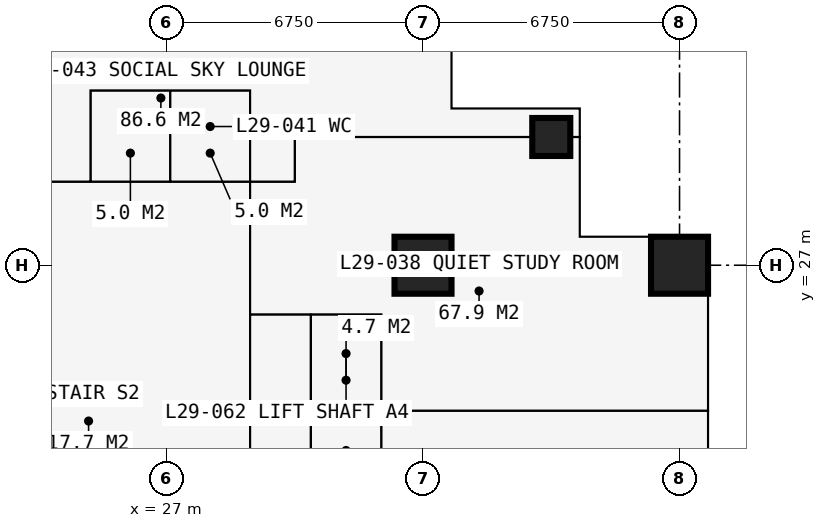
"""IFC4 building model, lengths in metres.
Left out: names, types, materials, properties, quantities, classifications, styles, units other than length and angle.
Written with IfcOpenShell. Run it as: python <this file> out.ifc"""

import sys

from ifc_helpers import new_model, si_unit, direction, frame, frame_2d, origin, origin_2d, place, context, subcontext, project, spatial, rectangle, extrude, element, fill, save


model = new_model("IFC4")
c1 = context("Model", 3, precision=1e-05, world=origin(), true_north=direction((0.0, 1.0)))
c2 = subcontext(c1, "Body", "Model", "MODEL_VIEW")
j1 = project(units=[si_unit("LENGTHUNIT", "METRE"), si_unit("PLANEANGLEUNIT", "RADIAN")], contexts=[c1])
p1 = place(None, origin())
s1 = spatial("IfcSite", under=j1, at=p1, CompositionType="ELEMENT")
p2 = place(p1, origin())
s2 = spatial("IfcBuilding", under=s1, at=p2, CompositionType="ELEMENT")
p3 = place(p2, frame((0.0, 0.0, 108.9)))
s3 = spatial("IfcBuildingStorey", under=s2, at=p3, CompositionType="ELEMENT", Elevation=108.9)
p4 = place(p3, frame((33.75, 27.0, 0.0), z_axis=(0.0, 0.0, 1.0), x_axis=(1.0, 0.0, 0.0)))
e1 = element("IfcColumn", 1, at=p4, inside=s3, PredefinedType="COLUMN", context=c2, shape_type="SweptSolid", body=[
    extrude(rectangle(XDim=1.5, YDim=1.5, at=origin_2d()), origin(), (0.0, 0.0, 1.0), 3.6),
])
p5 = place(p3, frame((37.125, 30.375, 0.0), z_axis=(0.0, 0.0, 1.0), x_axis=(1.0, 0.0, 0.0)))
e2 = element("IfcColumn", 2, at=p5, inside=s3, PredefinedType="COLUMN", context=c2, shape_type="SweptSolid", body=[
    extrude(rectangle(XDim=1.0, YDim=1.0, at=origin_2d()), origin(), (0.0, 0.0, 1.0), 3.6),
])
p6 = place(p3, frame((40.5, 27.0, 0.0), z_axis=(0.0, 0.0, 1.0), x_axis=(1.0, 0.0, 0.0)))
e3 = element("IfcColumn", 3, at=p6, inside=s3, PredefinedType="COLUMN", context=c2, shape_type="SweptSolid", body=[
    extrude(rectangle(XDim=1.5, YDim=1.5, at=origin_2d()), origin(), (0.0, 0.0, 1.0), 3.6),
])
p7 = place(p3, frame((27.0, 14.1, 0.0), z_axis=(0.0, 0.0, 1.0), x_axis=(0.0, 1.0, 0.0)))
e4 = element("IfcWall", 4, at=p7, inside=s3, PredefinedType="SHEAR", context=c2, shape_type="SweptSolid", body=[
    extrude(rectangle(XDim=12.3, YDim=1.2, at=frame_2d((6.15, 0.0))), origin(), (0.0, 0.0, 1.0), 3.6),
])
p8 = place(p7, frame((3.65, 0.0, 0.0)))
e5 = element("IfcOpeningElement", 5, at=p8, cuts=e4, PredefinedType="OPENING", context=c2, shape_type="SweptSolid", body=[
    extrude(rectangle(XDim=1.2, YDim=2.2, at=frame_2d((0.6, 1.1))), frame((0.0, 0.61, 0.0), z_axis=(0.0, -1.0, 0.0), x_axis=(1.0, 0.0, 0.0)), (0.0, 0.0, 1.0), 1.22),
])
p9 = place(p3, frame((27.6, 27.0, 0.0), z_axis=(0.0, 0.0, 1.0), x_axis=(-1.0, 0.0, 0.0)))
e6 = element("IfcWall", 6, at=p9, inside=s3, PredefinedType="SHEAR", context=c2, shape_type="SweptSolid", body=[
    extrude(rectangle(XDim=14.7, YDim=1.2, at=frame_2d((7.35, 0.0))), origin(), (0.0, 0.0, 1.0), 3.6),
])
p10 = place(p9, frame((4.55, 0.0, 0.0)))
e7 = element("IfcOpeningElement", 7, at=p10, cuts=e6, PredefinedType="OPENING", context=c2, shape_type="SweptSolid", body=[
    extrude(rectangle(XDim=0.9, YDim=2.2, at=frame_2d((0.45, 1.1))), frame((0.0, 0.61, 0.0), z_axis=(0.0, -1.0, 0.0), x_axis=(1.0, 0.0, 0.0)), (0.0, 0.0, 1.0), 1.22),
])
p11 = place(p9, frame((7.525, 0.0, 0.0)))
e8 = element("IfcOpeningElement", 8, at=p11, cuts=e6, PredefinedType="OPENING", context=c2, shape_type="SweptSolid", body=[
    extrude(rectangle(XDim=1.0, YDim=2.2, at=frame_2d((0.5, 1.1))), frame((0.0, 0.61, 0.0), z_axis=(0.0, -1.0, 0.0), x_axis=(1.0, 0.0, 0.0)), (0.0, 0.0, 1.0), 1.22),
])
p12 = place(p3, frame((41.25, 27.75, 0.0), z_axis=(0.0, 0.0, 1.0), x_axis=(-1.0, 0.0, 0.0)))
e9 = element("IfcWall", 9, at=p12, inside=s3, PredefinedType="SOLIDWALL", context=c2, shape_type="SweptSolid", body=[
    extrude(rectangle(XDim=3.375, YDim=0.3, at=frame_2d((1.688, 0.0))), origin(), (0.0, 0.0, 1.0), 3.375),
])
p13 = place(p12, frame((1.607, 0.0, 0.9)))
e10 = element("IfcOpeningElement", 10, at=p13, cuts=e9, PredefinedType="OPENING", context=c2, shape_type="SweptSolid", body=[
    extrude(rectangle(XDim=1.5, YDim=1.8, at=frame_2d((0.75, 0.9))), frame((0.0, 0.16, 0.0), z_axis=(0.0, -1.0, 0.0), x_axis=(1.0, 0.0, 0.0)), (0.0, 0.0, 1.0), 0.32),
])
p14 = place(p3, frame((37.875, 27.75, 0.0), z_axis=(0.0, 0.0, 1.0), x_axis=(0.0, 1.0, 0.0)))
e11 = element("IfcWall", 11, at=p14, inside=s3, PredefinedType="SOLIDWALL", context=c2, shape_type="SweptSolid", body=[
    extrude(rectangle(XDim=3.375, YDim=0.3, at=frame_2d((1.688, 0.0))), origin(), (0.0, 0.0, 1.0), 3.375),
])
p15 = place(p14, frame((0.788, 0.0, 0.6)))
e12 = element("IfcOpeningElement", 12, at=p15, cuts=e11, PredefinedType="OPENING", context=c2, shape_type="SweptSolid", body=[
    extrude(rectangle(XDim=1.8, YDim=2.1, at=frame_2d((0.9, 1.05))), frame((0.0, 0.16, 0.0), z_axis=(0.0, -1.0, 0.0), x_axis=(1.0, 0.0, 0.0)), (0.0, 0.0, 1.0), 0.32),
])
p16 = place(p3, frame((37.875, 31.125, 0.0), z_axis=(0.0, 0.0, 1.0), x_axis=(-1.0, 0.0, 0.0)))
e13 = element("IfcWall", 13, at=p16, inside=s3, PredefinedType="SOLIDWALL", context=c2, shape_type="SweptSolid", body=[
    extrude(rectangle(XDim=3.375, YDim=0.3, at=frame_2d((1.688, 0.0))), origin(), (0.0, 0.0, 1.0), 3.375),
])
p17 = place(p16, frame((0.788, 0.0, 0.6)))
e14 = element("IfcOpeningElement", 14, at=p17, cuts=e13, PredefinedType="OPENING", context=c2, shape_type="SweptSolid", body=[
    extrude(rectangle(XDim=1.8, YDim=2.1, at=frame_2d((0.9, 1.05))), frame((0.0, 0.16, 0.0), z_axis=(0.0, -1.0, 0.0), x_axis=(1.0, 0.0, 0.0)), (0.0, 0.0, 1.0), 0.32),
])
p18 = place(p3, frame((34.5, 31.125, 0.0), z_axis=(0.0, 0.0, 1.0), x_axis=(0.0, 1.0, 0.0)))
e15 = element("IfcWall", 15, at=p18, inside=s3, PredefinedType="SOLIDWALL", context=c2, shape_type="SweptSolid", body=[
    extrude(rectangle(XDim=3.375, YDim=0.3, at=frame_2d((1.688, 0.0))), origin(), (0.0, 0.0, 1.0), 3.375),
])
p19 = place(p18, frame((0.268, 0.0, 0.9)))
e16 = element("IfcOpeningElement", 16, at=p19, cuts=e15, PredefinedType="OPENING", context=c2, shape_type="SweptSolid", body=[
    extrude(rectangle(XDim=1.5, YDim=1.8, at=frame_2d((0.75, 0.9))), frame((0.0, 0.16, 0.0), z_axis=(0.0, -1.0, 0.0), x_axis=(1.0, 0.0, 0.0)), (0.0, 0.0, 1.0), 0.32),
])
p20 = place(p3, frame((11.3, 29.2, 0.0), z_axis=(0.0, 0.0, 1.0), x_axis=(1.0, 0.0, 0.0)))
e17 = element("IfcWall", 17, at=p20, inside=s3, PredefinedType="PARTITIONING", context=c2, shape_type="SweptSolid", body=[
    extrude(rectangle(XDim=19.075, YDim=0.15, at=frame_2d((9.538, 0.0))), origin(), (0.0, 0.0, 1.0), 3.375),
])
p21 = place(p20, frame((14.25, 0.0, 0.0)))
e18 = element("IfcOpeningElement", 18, at=p21, cuts=e17, PredefinedType="OPENING", context=c2, shape_type="SweptSolid", body=[
    extrude(rectangle(XDim=1.0, YDim=2.2, at=frame_2d((0.5, 1.1))), frame((0.0, 0.085, 0.0), z_axis=(0.0, -1.0, 0.0), x_axis=(1.0, 0.0, 0.0)), (0.0, 0.0, 1.0), 0.17),
])
p22 = place(p20, frame((16.35, 0.0, 0.0)))
e19 = element("IfcOpeningElement", 19, at=p22, cuts=e17, PredefinedType="OPENING", context=c2, shape_type="SweptSolid", body=[
    extrude(rectangle(XDim=1.0, YDim=2.2, at=frame_2d((0.5, 1.1))), frame((0.0, 0.085, 0.0), z_axis=(0.0, -1.0, 0.0), x_axis=(1.0, 0.0, 0.0)), (0.0, 0.0, 1.0), 0.17),
])
p23 = place(p20, frame((8.379, 0.0, 0.0)))
e20 = element("IfcOpeningElement", 20, at=p23, cuts=e17, PredefinedType="OPENING", context=c2, shape_type="SweptSolid", body=[
    extrude(rectangle(XDim=1.5, YDim=2.2, at=frame_2d((0.75, 1.1))), frame((0.0, 0.085, 0.0), z_axis=(0.0, -1.0, 0.0), x_axis=(1.0, 0.0, 0.0)), (0.0, 0.0, 1.0), 0.17),
])
p24 = place(p3, frame((25.0, 29.2, 0.0), z_axis=(0.0, 0.0, 1.0), x_axis=(0.0, 1.0, 0.0)))
e21 = element("IfcWall", 21, at=p24, inside=s3, PredefinedType="PARTITIONING", context=c2, shape_type="SweptSolid", body=[
    extrude(rectangle(XDim=2.4, YDim=0.1, at=frame_2d((1.2, 0.0))), origin(), (0.0, 0.0, 1.0), 3.375),
])
p25 = place(p3, frame((25.0, 31.6, 0.0), z_axis=(0.0, 0.0, 1.0), x_axis=(1.0, 0.0, 0.0)))
e22 = element("IfcWall", 22, at=p25, inside=s3, PredefinedType="PARTITIONING", context=c2, shape_type="SweptSolid", body=[
    extrude(rectangle(XDim=4.2, YDim=0.15, at=frame_2d((2.1, 0.0))), origin(), (0.0, 0.0, 1.0), 3.375),
])
p26 = place(p3, frame((27.1, 29.2, 0.0), z_axis=(0.0, 0.0, 1.0), x_axis=(0.0, 1.0, 0.0)))
e23 = element("IfcWall", 23, at=p26, inside=s3, PredefinedType="PARTITIONING", context=c2, shape_type="SweptSolid", body=[
    extrude(rectangle(XDim=2.4, YDim=0.1, at=frame_2d((1.2, 0.0))), origin(), (0.0, 0.0, 1.0), 2.806),
])
p27 = place(p3, frame((29.2, 11.3, 0.0), z_axis=(0.0, 0.0, 1.0), x_axis=(0.0, 1.0, 0.0)))
e24 = element("IfcWall", 24, at=p27, inside=s3, PredefinedType="PARTITIONING", context=c2, shape_type="SweptSolid", body=[
    extrude(rectangle(XDim=20.3, YDim=0.15, at=frame_2d((10.15, 0.0))), origin(), (0.0, 0.0, 1.0), 3.375),
])
p28 = place(p27, frame((8.35, 0.0, 0.0)))
e25 = element("IfcOpeningElement", 25, at=p28, cuts=e24, PredefinedType="OPENING", context=c2, shape_type="SweptSolid", body=[
    extrude(rectangle(XDim=1.2, YDim=2.2, at=frame_2d((0.6, 1.1))), frame((0.0, 0.085, 0.0), z_axis=(0.0, -1.0, 0.0), x_axis=(1.0, 0.0, 0.0)), (0.0, 0.0, 1.0), 0.17),
])
p29 = place(p3, frame((29.2, 25.7, 0.0), z_axis=(0.0, 0.0, 1.0), x_axis=(1.0, 0.0, 0.0)))
e26 = element("IfcWall", 26, at=p29, inside=s3, PredefinedType="SHEAR", context=c2, shape_type="SweptSolid", body=[
    extrude(rectangle(XDim=3.45, YDim=0.1, at=frame_2d((1.725, 0.0))), origin(), (0.0, 0.0, 1.0), 3.375),
])
p30 = place(p3, frame((30.375, 29.2, 0.0), z_axis=(0.0, 0.0, 1.0), x_axis=(0.0, 1.0, 0.0)))
e27 = element("IfcWall", 27, at=p30, inside=s3, PredefinedType="PARTITIONING", context=c2, shape_type="SweptSolid", body=[
    extrude(rectangle(XDim=1.175, YDim=0.15, at=frame_2d((0.587, 0.0))), origin(), (0.0, 0.0, 1.0), 3.375),
])
p31 = place(p3, frame((30.375, 30.375, 0.0), z_axis=(0.0, 0.0, 1.0), x_axis=(1.0, 0.0, 0.0)))
e28 = element("IfcWall", 28, at=p31, inside=s3, PredefinedType="PARTITIONING", context=c2, shape_type="SweptSolid", body=[
    extrude(rectangle(XDim=7.35, YDim=0.15, at=frame_2d((3.675, 0.0))), origin(), (0.0, 0.0, 1.0), 2.877),
])
p32 = place(p3, frame((30.8, 14.8, 0.0), z_axis=(0.0, 0.0, 1.0), x_axis=(0.0, 1.0, 0.0)))
e29 = element("IfcWall", 29, at=p32, inside=s3, PredefinedType="PARTITIONING", context=c2, shape_type="SweptSolid", body=[
    extrude(rectangle(XDim=10.9, YDim=0.15, at=frame_2d((5.45, 0.0))), origin(), (0.0, 0.0, 1.0), 3.375),
])
p33 = place(p32, frame((0.75, 0.0, 0.0)))
e30 = element("IfcOpeningElement", 30, at=p33, cuts=e29, PredefinedType="OPENING", context=c2, shape_type="SweptSolid", body=[
    extrude(rectangle(XDim=1.1, YDim=2.2, at=frame_2d((0.55, 1.1))), frame((0.0, 0.085, 0.0), z_axis=(0.0, -1.0, 0.0), x_axis=(1.0, 0.0, 0.0)), (0.0, 0.0, 1.0), 0.17),
])
p34 = place(p32, frame((3.25, 0.0, 0.0)))
e31 = element("IfcOpeningElement", 31, at=p34, cuts=e29, PredefinedType="OPENING", context=c2, shape_type="SweptSolid", body=[
    extrude(rectangle(XDim=1.1, YDim=2.2, at=frame_2d((0.55, 1.1))), frame((0.0, 0.085, 0.0), z_axis=(0.0, -1.0, 0.0), x_axis=(1.0, 0.0, 0.0)), (0.0, 0.0, 1.0), 0.17),
])
p35 = place(p32, frame((6.5, 0.0, 0.0)))
e32 = element("IfcOpeningElement", 32, at=p35, cuts=e29, PredefinedType="OPENING", context=c2, shape_type="SweptSolid", body=[
    extrude(rectangle(XDim=1.1, YDim=2.2, at=frame_2d((0.55, 1.1))), frame((0.0, 0.085, 0.0), z_axis=(0.0, -1.0, 0.0), x_axis=(1.0, 0.0, 0.0)), (0.0, 0.0, 1.0), 0.17),
])
p36 = place(p32, frame((9.05, 0.0, 0.0)))
e33 = element("IfcOpeningElement", 33, at=p36, cuts=e29, PredefinedType="OPENING", context=c2, shape_type="SweptSolid", body=[
    extrude(rectangle(XDim=1.1, YDim=2.2, at=frame_2d((0.55, 1.1))), frame((0.0, 0.085, 0.0), z_axis=(0.0, -1.0, 0.0), x_axis=(1.0, 0.0, 0.0)), (0.0, 0.0, 1.0), 0.17),
])
p37 = place(p3, frame((30.8, 23.15, 0.0), z_axis=(0.0, 0.0, 1.0), x_axis=(1.0, 0.0, 0.0)))
e34 = element("IfcWall", 34, at=p37, inside=s3, PredefinedType="SHEAR", context=c2, shape_type="SweptSolid", body=[
    extrude(rectangle(XDim=1.85, YDim=0.1, at=frame_2d((0.925, 0.0))), origin(), (0.0, 0.0, 1.0), 3.375),
])
p38 = place(p3, frame((32.65, 20.6, 0.0), z_axis=(0.0, 0.0, 1.0), x_axis=(0.0, 1.0, 0.0)))
e35 = element("IfcWall", 35, at=p38, inside=s3, PredefinedType="PARTITIONING", context=c2, shape_type="SweptSolid", body=[
    extrude(rectangle(XDim=5.1, YDim=0.15, at=frame_2d((2.55, 0.0))), origin(), (0.0, 0.0, 1.0), 3.375),
])
p39 = place(p3, frame((32.65, 23.168, 0.0), z_axis=(0.0, 0.0, 1.0), x_axis=(1.0, 0.0, 0.0)))
e36 = element("IfcWall", 36, at=p39, inside=s3, PredefinedType="PARTITIONING", context=c2, shape_type="SweptSolid", body=[
    extrude(rectangle(XDim=8.584, YDim=0.15, at=frame_2d((4.292, 0.0))), origin(), (0.0, 0.0, 1.0), 3.375),
])
p40 = place(p39, frame((3.5, 0.0, 0.0)))
e37 = element("IfcOpeningElement", 37, at=p40, cuts=e36, PredefinedType="OPENING", context=c2, shape_type="SweptSolid", body=[
    extrude(rectangle(XDim=1.6, YDim=2.4, at=frame_2d((0.8, 1.2))), frame((0.0, 0.085, 0.0), z_axis=(0.0, -1.0, 0.0), x_axis=(1.0, 0.0, 0.0)), (0.0, 0.0, 1.0), 0.17),
])
p41 = place(p13, origin())
e38 = element("IfcWindow", 38, at=p41, inside=s3, PartitioningType="SINGLE_PANEL", PredefinedType="WINDOW", context=c2, shape_type="SweptSolid", body=[
    extrude(rectangle(XDim=1.5, YDim=1.8, at=frame_2d((0.75, 0.9))), frame((0.0, 0.03, 0.0), z_axis=(0.0, -1.0, 0.0), x_axis=(1.0, 0.0, 0.0)), (0.0, 0.0, 1.0), 0.06),
])
fill(e10, e38)
p42 = place(p15, origin())
e39 = element("IfcWindow", 39, at=p42, inside=s3, PartitioningType="SINGLE_PANEL", PredefinedType="WINDOW", context=c2, shape_type="SweptSolid", body=[
    extrude(rectangle(XDim=1.8, YDim=2.1, at=frame_2d((0.9, 1.05))), frame((0.0, 0.03, 0.0), z_axis=(0.0, -1.0, 0.0), x_axis=(1.0, 0.0, 0.0)), (0.0, 0.0, 1.0), 0.06),
])
fill(e12, e39)
p43 = place(p17, origin())
e40 = element("IfcWindow", 40, at=p43, inside=s3, PartitioningType="SINGLE_PANEL", PredefinedType="WINDOW", context=c2, shape_type="SweptSolid", body=[
    extrude(rectangle(XDim=1.8, YDim=2.1, at=frame_2d((0.9, 1.05))), frame((0.0, 0.03, 0.0), z_axis=(0.0, -1.0, 0.0), x_axis=(1.0, 0.0, 0.0)), (0.0, 0.0, 1.0), 0.06),
])
fill(e14, e40)
p44 = place(p19, origin())
e41 = element("IfcWindow", 41, at=p44, inside=s3, PartitioningType="SINGLE_PANEL", PredefinedType="WINDOW", context=c2, shape_type="SweptSolid", body=[
    extrude(rectangle(XDim=1.5, YDim=1.8, at=frame_2d((0.75, 0.9))), frame((0.0, 0.03, 0.0), z_axis=(0.0, -1.0, 0.0), x_axis=(1.0, 0.0, 0.0)), (0.0, 0.0, 1.0), 0.06),
])
fill(e16, e41)
p45 = place(p40, origin())
e42 = element("IfcDoor", 42, at=p45, inside=s3, OperationType="DOUBLE_DOOR_SINGLE_SWING", PredefinedType="DOOR", context=c2, shape_type="SweptSolid", body=[
    extrude(rectangle(XDim=1.6, YDim=2.4, at=frame_2d((0.8, 1.2))), frame((0.0, 0.025, 0.0), z_axis=(0.0, -1.0, 0.0), x_axis=(1.0, 0.0, 0.0)), (0.0, 0.0, 1.0), 0.05),
])
fill(e37, e42)
p46 = place(p21, origin())
e43 = element("IfcDoor", 43, at=p46, inside=s3, OperationType="SINGLE_SWING_LEFT", PredefinedType="DOOR", context=c2, shape_type="SweptSolid", body=[
    extrude(rectangle(XDim=1.0, YDim=2.2, at=frame_2d((0.5, 1.1))), frame((0.0, 0.025, 0.0), z_axis=(0.0, -1.0, 0.0), x_axis=(1.0, 0.0, 0.0)), (0.0, 0.0, 1.0), 0.05),
])
fill(e18, e43)
p47 = place(p22, origin())
e44 = element("IfcDoor", 44, at=p47, inside=s3, OperationType="SINGLE_SWING_LEFT", PredefinedType="DOOR", context=c2, shape_type="SweptSolid", body=[
    extrude(rectangle(XDim=1.0, YDim=2.2, at=frame_2d((0.5, 1.1))), frame((0.0, 0.025, 0.0), z_axis=(0.0, -1.0, 0.0), x_axis=(1.0, 0.0, 0.0)), (0.0, 0.0, 1.0), 0.05),
])
fill(e19, e44)
p48 = place(p35, origin())
e45 = element("IfcDoor", 45, at=p48, inside=s3, OperationType="DOUBLE_DOOR_SLIDING", PredefinedType="DOOR", context=c2, shape_type="SweptSolid", body=[
    extrude(rectangle(XDim=1.1, YDim=2.2, at=frame_2d((0.55, 1.1))), frame((0.0, 0.025, 0.0), z_axis=(0.0, -1.0, 0.0), x_axis=(1.0, 0.0, 0.0)), (0.0, 0.0, 1.0), 0.05),
])
fill(e32, e45)
p49 = place(p36, origin())
e46 = element("IfcDoor", 46, at=p49, inside=s3, OperationType="DOUBLE_DOOR_SLIDING", PredefinedType="DOOR", context=c2, shape_type="SweptSolid", body=[
    extrude(rectangle(XDim=1.1, YDim=2.2, at=frame_2d((0.55, 1.1))), frame((0.0, 0.025, 0.0), z_axis=(0.0, -1.0, 0.0), x_axis=(1.0, 0.0, 0.0)), (0.0, 0.0, 1.0), 0.05),
])
fill(e33, e46)
save(model, sys.argv[1])
